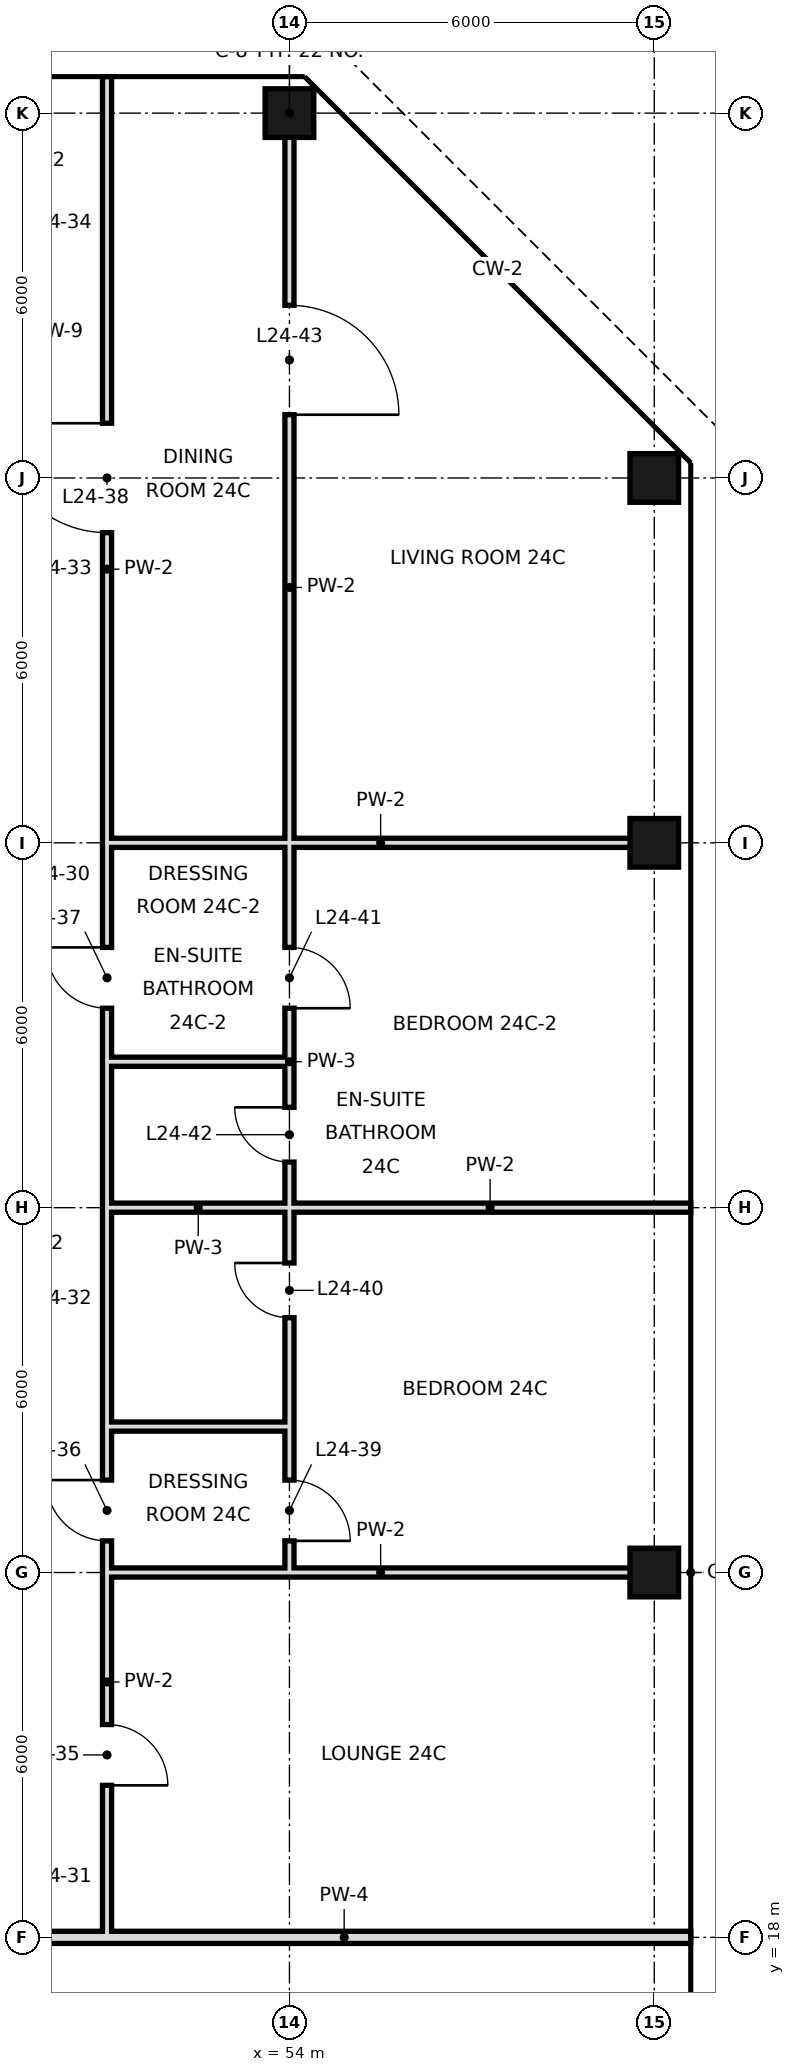
"""IFC4 building model, lengths in metres.
Left out: names, types, materials, properties, quantities, classifications, styles, units other than length and angle.
Written with IfcOpenShell. Run it as: python <this file> out.ifc"""

import sys

from ifc_helpers import new_model, si_unit, direction, frame, frame_2d, origin, origin_2d, place, context, subcontext, project, spatial, rectangle, hollow_rectangle, extrude, element, fill, save


model = new_model("IFC4")
c1 = context("Model", 3, precision=1e-05, world=origin(), true_north=direction((0.0, 1.0)))
c2 = subcontext(c1, "Body", "Model", "MODEL_VIEW")
j1 = project(units=[si_unit("LENGTHUNIT", "METRE"), si_unit("PLANEANGLEUNIT", "RADIAN")], contexts=[c1])
p1 = place(None, origin())
s1 = spatial("IfcSite", under=j1, at=p1, CompositionType="ELEMENT")
p2 = place(p1, origin())
s2 = spatial("IfcBuilding", under=s1, at=p2, CompositionType="ELEMENT")
p3 = place(p2, frame((0.0, 0.0, 110.6)))
s3 = spatial("IfcBuildingStorey", under=s2, at=p3, CompositionType="ELEMENT", Elevation=110.6)
for number, where, z_axis, x_axis in (
    (1, (54.0, 48.0, 0.0), (0.0, 0.0, 1.0), (1.0, 0.0, 0.0)),
    (2, (60.0, 24.0, 0.0), (0.0, 0.0, 1.0), (1.0, 0.0, 0.0)),
    (3, (60.0, 36.0, 0.0), (0.0, 0.0, 1.0), (1.0, 0.0, 0.0)),
    (4, (60.0, 42.0, 0.0), (0.0, 0.0, 1.0), (1.0, 0.0, 0.0)),
):
    element("IfcColumn", number, at=place(p3, frame(where, z_axis=z_axis, x_axis=x_axis)), inside=s3, PredefinedType="COLUMN", context=c2, shape_type="SweptSolid", body=[
        extrude(hollow_rectangle(XDim=0.8, YDim=0.8, WallThickness=0.04, at=origin_2d()), origin(), (0.0, 0.0, 1.0), 3.6),
    ])
p4 = place(p3, frame((51.0, 18.0, 0.0), z_axis=(0.0, 0.0, 1.0), x_axis=(0.0, 1.0, 0.0)))
e5 = element("IfcWall", 5, at=p4, inside=s3, PredefinedType="PARTITIONING", context=c2, shape_type="SweptSolid", body=[
    extrude(rectangle(XDim=8.4, YDim=0.15, at=frame_2d((4.2, 0.0))), origin(), (0.0, 0.0, 1.0), 3.38),
])
p5 = place(p4, frame((2.5, 0.0, 0.0)))
e6 = element("IfcOpeningElement", 6, at=p5, cuts=e5, PredefinedType="OPENING", context=c2, shape_type="SweptSolid", body=[
    extrude(rectangle(XDim=1.0, YDim=2.4, at=frame_2d((0.5, 1.2))), frame((0.0, 0.085, 0.0), z_axis=(0.0, -1.0, 0.0), x_axis=(1.0, 0.0, 0.0)), (0.0, 0.0, 1.0), 0.17),
])
p6 = place(p4, frame((6.52, 0.0, 0.0)))
e7 = element("IfcOpeningElement", 7, at=p6, cuts=e5, PredefinedType="OPENING", context=c2, shape_type="SweptSolid", body=[
    extrude(rectangle(XDim=1.0, YDim=2.4, at=frame_2d((0.5, 1.2))), frame((0.0, 0.085, 0.0), z_axis=(0.0, -1.0, 0.0), x_axis=(1.0, 0.0, 0.0)), (0.0, 0.0, 1.0), 0.17),
])
p7 = place(p3, frame((51.0, 32.4, 0.0), z_axis=(0.0, 0.0, 1.0), x_axis=(0.0, 1.0, 0.0)))
e8 = element("IfcWall", 8, at=p7, inside=s3, PredefinedType="PARTITIONING", context=c2, shape_type="SweptSolid", body=[
    extrude(rectangle(XDim=16.2, YDim=0.15, at=frame_2d((8.1, 0.0))), origin(), (0.0, 0.0, 1.0), 3.38),
])
p8 = place(p7, frame((0.88, 0.0, 0.0)))
e9 = element("IfcOpeningElement", 9, at=p8, cuts=e8, PredefinedType="OPENING", context=c2, shape_type="SweptSolid", body=[
    extrude(rectangle(XDim=1.0, YDim=2.4, at=frame_2d((0.5, 1.2))), frame((0.0, 0.085, 0.0), z_axis=(0.0, -1.0, 0.0), x_axis=(1.0, 0.0, 0.0)), (0.0, 0.0, 1.0), 0.17),
])
p9 = place(p7, frame((8.7, 0.0, 0.0)))
e10 = element("IfcOpeningElement", 10, at=p9, cuts=e8, PredefinedType="OPENING", context=c2, shape_type="SweptSolid", body=[
    extrude(rectangle(XDim=1.8, YDim=2.4, at=frame_2d((0.9, 1.2))), frame((0.0, 0.085, 0.0), z_axis=(0.0, -1.0, 0.0), x_axis=(1.0, 0.0, 0.0)), (0.0, 0.0, 1.0), 0.17),
])
p10 = place(p3, frame((51.0, 26.4, 0.0), z_axis=(0.0, 0.0, 1.0), x_axis=(0.0, 1.0, 0.0)))
e11 = element("IfcWall", 11, at=p10, inside=s3, PredefinedType="PARTITIONING", context=c2, shape_type="SweptSolid", body=[
    extrude(rectangle(XDim=6.0, YDim=0.15, at=frame_2d((3.0, 0.0))), origin(), (0.0, 0.0, 1.0), 3.38),
])
p11 = place(p3, frame((54.0, 24.0, 0.0), z_axis=(0.0, 0.0, 1.0), x_axis=(0.0, 1.0, 0.0)))
e12 = element("IfcWall", 12, at=p11, inside=s3, PredefinedType="PARTITIONING", context=c2, shape_type="SweptSolid", body=[
    extrude(rectangle(XDim=2.4, YDim=0.15, at=frame_2d((1.2, 0.0))), origin(), (0.0, 0.0, 1.0), 3.38),
])
p12 = place(p11, frame((0.52, 0.0, 0.0)))
e13 = element("IfcOpeningElement", 13, at=p12, cuts=e12, PredefinedType="OPENING", context=c2, shape_type="SweptSolid", body=[
    extrude(rectangle(XDim=1.0, YDim=2.4, at=frame_2d((0.5, 1.2))), frame((0.0, 0.085, 0.0), z_axis=(0.0, -1.0, 0.0), x_axis=(1.0, 0.0, 0.0)), (0.0, 0.0, 1.0), 0.17),
])
p13 = place(p3, frame((54.0, 32.4, 0.0), z_axis=(0.0, 0.0, 1.0), x_axis=(0.0, 1.0, 0.0)))
e14 = element("IfcWall", 14, at=p13, inside=s3, PredefinedType="PARTITIONING", context=c2, shape_type="SweptSolid", body=[
    extrude(rectangle(XDim=15.6, YDim=0.15, at=frame_2d((7.8, 0.0))), origin(), (0.0, 0.0, 1.0), 3.38),
])
p14 = place(p13, frame((0.88, 0.0, 0.0)))
e15 = element("IfcOpeningElement", 15, at=p14, cuts=e14, PredefinedType="OPENING", context=c2, shape_type="SweptSolid", body=[
    extrude(rectangle(XDim=1.0, YDim=2.4, at=frame_2d((0.5, 1.2))), frame((0.0, 0.085, 0.0), z_axis=(0.0, -1.0, 0.0), x_axis=(1.0, 0.0, 0.0)), (0.0, 0.0, 1.0), 0.17),
])
p15 = place(p13, frame((10.64, 0.0, 0.0)))
e16 = element("IfcOpeningElement", 16, at=p15, cuts=e14, PredefinedType="OPENING", context=c2, shape_type="SweptSolid", body=[
    extrude(rectangle(XDim=1.8, YDim=2.4, at=frame_2d((0.9, 1.2))), frame((0.0, 0.085, 0.0), z_axis=(0.0, -1.0, 0.0), x_axis=(1.0, 0.0, 0.0)), (0.0, 0.0, 1.0), 0.17),
])
p16 = place(p3, frame((54.0, 26.4, 0.0), z_axis=(0.0, 0.0, 1.0), x_axis=(0.0, 1.0, 0.0)))
e17 = element("IfcWall", 17, at=p16, inside=s3, PredefinedType="PARTITIONING", context=c2, shape_type="SweptSolid", body=[
    extrude(rectangle(XDim=6.0, YDim=0.15, at=frame_2d((3.0, 0.0))), origin(), (0.0, 0.0, 1.0), 3.38),
])
p17 = place(p16, frame((1.79, 0.0, 0.0)))
e18 = element("IfcOpeningElement", 18, at=p17, cuts=e17, PredefinedType="OPENING", context=c2, shape_type="SweptSolid", body=[
    extrude(rectangle(XDim=0.9, YDim=2.4, at=frame_2d((0.45, 1.2))), frame((0.0, 0.085, 0.0), z_axis=(0.0, -1.0, 0.0), x_axis=(1.0, 0.0, 0.0)), (0.0, 0.0, 1.0), 0.17),
])
p18 = place(p16, frame((4.35, 0.0, 0.0)))
e19 = element("IfcOpeningElement", 19, at=p18, cuts=e17, PredefinedType="OPENING", context=c2, shape_type="SweptSolid", body=[
    extrude(rectangle(XDim=0.9, YDim=2.4, at=frame_2d((0.45, 1.2))), frame((0.0, 0.085, 0.0), z_axis=(0.0, -1.0, 0.0), x_axis=(1.0, 0.0, 0.0)), (0.0, 0.0, 1.0), 0.17),
])
p19 = place(p3, frame((49.2, 18.0, 0.0), z_axis=(0.0, 0.0, 1.0), x_axis=(1.0, 0.0, 0.0)))
e20 = element("IfcWall", 20, at=p19, inside=s3, PredefinedType="SOLIDWALL", context=c2, shape_type="SweptSolid", body=[
    extrude(rectangle(XDim=11.4, YDim=0.2, at=frame_2d((5.7, 0.0))), origin(), (0.0, 0.0, 1.0), 2.68),
])
p20 = place(p3, frame((51.0, 24.0, 0.0), z_axis=(0.0, 0.0, 1.0), x_axis=(1.0, 0.0, 0.0)))
e21 = element("IfcWall", 21, at=p20, inside=s3, PredefinedType="PARTITIONING", context=c2, shape_type="SweptSolid", body=[
    extrude(rectangle(XDim=9.0, YDim=0.15, at=frame_2d((4.5, 0.0))), origin(), (0.0, 0.0, 1.0), 2.68),
])
p21 = place(p3, frame((51.0, 26.4, 0.0), z_axis=(0.0, 0.0, 1.0), x_axis=(1.0, 0.0, 0.0)))
e22 = element("IfcWall", 22, at=p21, inside=s3, PredefinedType="PARTITIONING", context=c2, shape_type="SweptSolid", body=[
    extrude(rectangle(XDim=3.0, YDim=0.15, at=frame_2d((1.5, 0.0))), origin(), (0.0, 0.0, 1.0), 3.38),
])
p22 = place(p3, frame((54.0, 30.0, 0.0), z_axis=(0.0, 0.0, 1.0), x_axis=(1.0, 0.0, 0.0)))
e23 = element("IfcWall", 23, at=p22, inside=s3, PredefinedType="PARTITIONING", context=c2, shape_type="SweptSolid", body=[
    extrude(rectangle(XDim=6.6, YDim=0.15, at=frame_2d((3.3, 0.0))), origin(), (0.0, 0.0, 1.0), 2.68),
])
p23 = place(p3, frame((51.0, 30.0, 0.0), z_axis=(0.0, 0.0, 1.0), x_axis=(1.0, 0.0, 0.0)))
e24 = element("IfcWall", 24, at=p23, inside=s3, PredefinedType="PARTITIONING", context=c2, shape_type="SweptSolid", body=[
    extrude(rectangle(XDim=3.0, YDim=0.15, at=frame_2d((1.5, 0.0))), origin(), (0.0, 0.0, 1.0), 2.68),
])
p24 = place(p3, frame((51.0, 32.4, 0.0), z_axis=(0.0, 0.0, 1.0), x_axis=(1.0, 0.0, 0.0)))
e25 = element("IfcWall", 25, at=p24, inside=s3, PredefinedType="PARTITIONING", context=c2, shape_type="SweptSolid", body=[
    extrude(rectangle(XDim=3.0, YDim=0.15, at=frame_2d((1.5, 0.0))), origin(), (0.0, 0.0, 1.0), 3.38),
])
p25 = place(p3, frame((51.0, 36.0, 0.0), z_axis=(0.0, 0.0, 1.0), x_axis=(1.0, 0.0, 0.0)))
e26 = element("IfcWall", 26, at=p25, inside=s3, PredefinedType="PARTITIONING", context=c2, shape_type="SweptSolid", body=[
    extrude(rectangle(XDim=9.0, YDim=0.15, at=frame_2d((4.5, 0.0))), origin(), (0.0, 0.0, 1.0), 2.68),
])
p26 = place(p5, frame((1.0, 0.0, 0.0), z_axis=(0.0, 0.0, 1.0), x_axis=(-1.0, 0.0, 0.0)))
e27 = element("IfcDoor", 27, at=p26, inside=s3, OperationType="SINGLE_SWING_RIGHT", PredefinedType="DOOR", context=c2, shape_type="SweptSolid", body=[
    extrude(rectangle(XDim=1.0, YDim=2.4, at=frame_2d((0.5, 1.2))), frame((0.0, 0.025, 0.0), z_axis=(0.0, -1.0, 0.0), x_axis=(1.0, 0.0, 0.0)), (0.0, 0.0, 1.0), 0.05),
])
fill(e6, e27)
p27 = place(p6, frame((1.0, 0.0, 0.0), z_axis=(0.0, 0.0, 1.0), x_axis=(-1.0, 0.0, 0.0)))
e28 = element("IfcDoor", 28, at=p27, inside=s3, OperationType="SINGLE_SWING_LEFT", PredefinedType="DOOR", context=c2, shape_type="SweptSolid", body=[
    extrude(rectangle(XDim=1.0, YDim=2.4, at=frame_2d((0.5, 1.2))), frame((0.0, 0.025, 0.0), z_axis=(0.0, -1.0, 0.0), x_axis=(1.0, 0.0, 0.0)), (0.0, 0.0, 1.0), 0.05),
])
fill(e7, e28)
p28 = place(p8, frame((1.0, 0.0, 0.0), z_axis=(0.0, 0.0, 1.0), x_axis=(-1.0, 0.0, 0.0)))
e29 = element("IfcDoor", 29, at=p28, inside=s3, OperationType="SINGLE_SWING_LEFT", PredefinedType="DOOR", context=c2, shape_type="SweptSolid", body=[
    extrude(rectangle(XDim=1.0, YDim=2.4, at=frame_2d((0.5, 1.2))), frame((0.0, 0.025, 0.0), z_axis=(0.0, -1.0, 0.0), x_axis=(1.0, 0.0, 0.0)), (0.0, 0.0, 1.0), 0.05),
])
fill(e9, e29)
p29 = place(p9, frame((1.8, 0.0, 0.0), z_axis=(0.0, 0.0, 1.0), x_axis=(-1.0, 0.0, 0.0)))
e30 = element("IfcDoor", 30, at=p29, inside=s3, OperationType="SINGLE_SWING_LEFT", PredefinedType="DOOR", context=c2, shape_type="SweptSolid", body=[
    extrude(rectangle(XDim=1.8, YDim=2.4, at=frame_2d((0.9, 1.2))), frame((0.0, 0.025, 0.0), z_axis=(0.0, -1.0, 0.0), x_axis=(1.0, 0.0, 0.0)), (0.0, 0.0, 1.0), 0.05),
])
fill(e10, e30)
p30 = place(p12, frame((1.0, 0.0, 0.0), z_axis=(0.0, 0.0, 1.0), x_axis=(-1.0, 0.0, 0.0)))
e31 = element("IfcDoor", 31, at=p30, inside=s3, OperationType="SINGLE_SWING_RIGHT", PredefinedType="DOOR", context=c2, shape_type="SweptSolid", body=[
    extrude(rectangle(XDim=1.0, YDim=2.4, at=frame_2d((0.5, 1.2))), frame((0.0, 0.025, 0.0), z_axis=(0.0, -1.0, 0.0), x_axis=(1.0, 0.0, 0.0)), (0.0, 0.0, 1.0), 0.05),
])
fill(e13, e31)
p31 = place(p17, frame((0.9, 0.0, 0.0), z_axis=(0.0, 0.0, 1.0), x_axis=(-1.0, 0.0, 0.0)))
e32 = element("IfcDoor", 32, at=p31, inside=s3, OperationType="SINGLE_SWING_LEFT", PredefinedType="DOOR", context=c2, shape_type="SweptSolid", body=[
    extrude(rectangle(XDim=0.9, YDim=2.4, at=frame_2d((0.45, 1.2))), frame((0.0, 0.025, 0.0), z_axis=(0.0, -1.0, 0.0), x_axis=(1.0, 0.0, 0.0)), (0.0, 0.0, 1.0), 0.05),
])
fill(e18, e32)
p32 = place(p14, frame((1.0, 0.0, 0.0), z_axis=(0.0, 0.0, 1.0), x_axis=(-1.0, 0.0, 0.0)))
e33 = element("IfcDoor", 33, at=p32, inside=s3, OperationType="SINGLE_SWING_RIGHT", PredefinedType="DOOR", context=c2, shape_type="SweptSolid", body=[
    extrude(rectangle(XDim=1.0, YDim=2.4, at=frame_2d((0.5, 1.2))), frame((0.0, 0.025, 0.0), z_axis=(0.0, -1.0, 0.0), x_axis=(1.0, 0.0, 0.0)), (0.0, 0.0, 1.0), 0.05),
])
fill(e15, e33)
p33 = place(p18, frame((0.9, 0.0, 0.0), z_axis=(0.0, 0.0, 1.0), x_axis=(-1.0, 0.0, 0.0)))
e34 = element("IfcDoor", 34, at=p33, inside=s3, OperationType="SINGLE_SWING_LEFT", PredefinedType="DOOR", context=c2, shape_type="SweptSolid", body=[
    extrude(rectangle(XDim=0.9, YDim=2.4, at=frame_2d((0.45, 1.2))), frame((0.0, 0.025, 0.0), z_axis=(0.0, -1.0, 0.0), x_axis=(1.0, 0.0, 0.0)), (0.0, 0.0, 1.0), 0.05),
])
fill(e19, e34)
p34 = place(p15, frame((1.8, 0.0, 0.0), z_axis=(0.0, 0.0, 1.0), x_axis=(-1.0, 0.0, 0.0)))
e35 = element("IfcDoor", 35, at=p34, inside=s3, OperationType="SINGLE_SWING_RIGHT", PredefinedType="DOOR", context=c2, shape_type="SweptSolid", body=[
    extrude(rectangle(XDim=1.8, YDim=2.4, at=frame_2d((0.9, 1.2))), frame((0.0, 0.025, 0.0), z_axis=(0.0, -1.0, 0.0), x_axis=(1.0, 0.0, 0.0)), (0.0, 0.0, 1.0), 0.05),
])
fill(e16, e35)
save(model, sys.argv[1])
